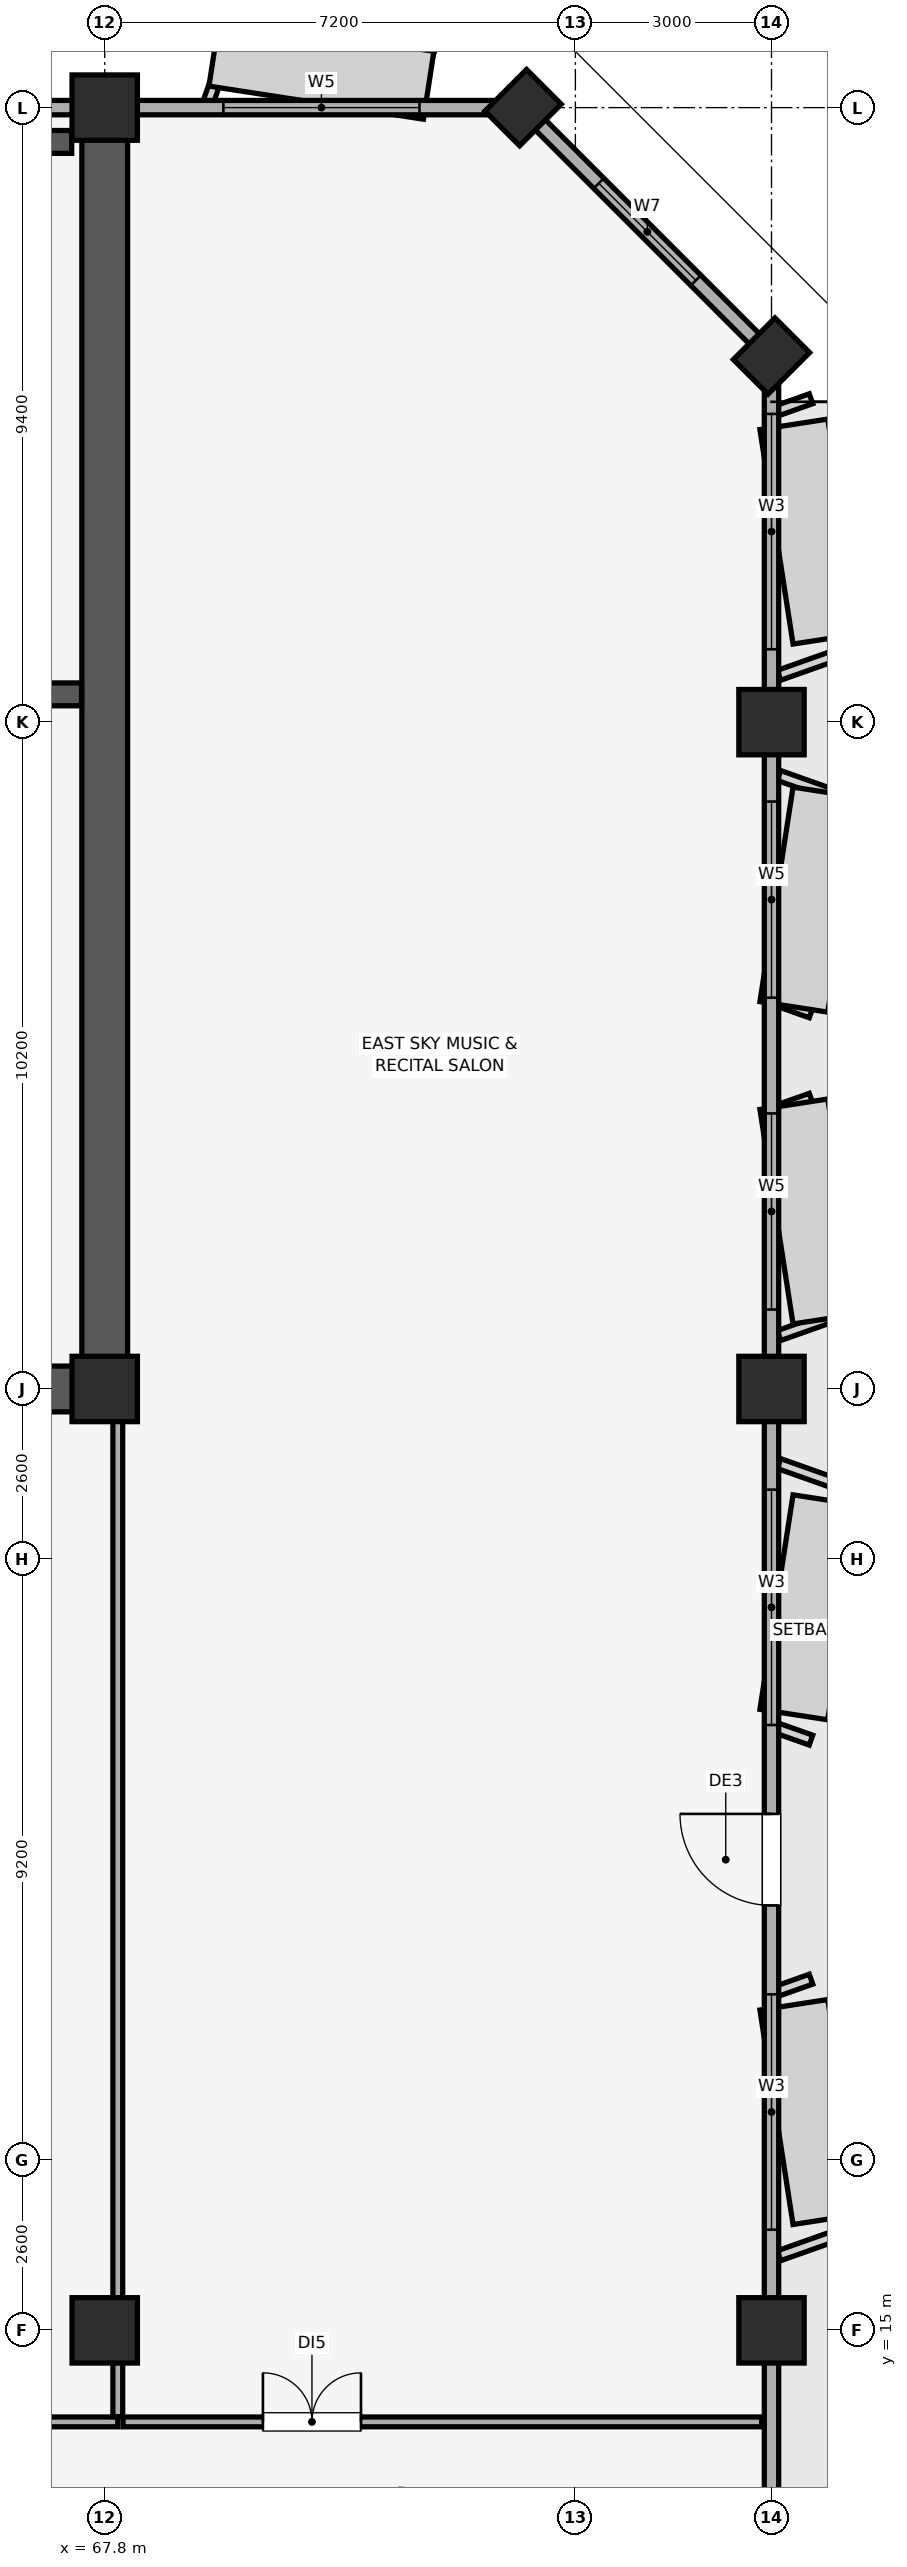
"""IFC4 building model, lengths in metres.
Left out: names, types, materials, properties, quantities, classifications, styles, units other than length and angle.
Written with IfcOpenShell. Run it as: python <this file> out.ifc"""

import sys

from ifc_helpers import new_model, si_unit, direction, frame, frame_2d, origin, origin_2d, place, context, subcontext, project, spatial, rectangle, extrude, element, fill, save


model = new_model("IFC4")
c1 = context("Model", 3, precision=1e-05, world=origin(), true_north=direction((0.0, 1.0)))
c2 = subcontext(c1, "Body", "Model", "MODEL_VIEW")
j1 = project(units=[si_unit("LENGTHUNIT", "METRE"), si_unit("PLANEANGLEUNIT", "RADIAN")], contexts=[c1])
p1 = place(None, origin())
s1 = spatial("IfcSite", under=j1, at=p1, CompositionType="ELEMENT")
p2 = place(p1, origin())
s2 = spatial("IfcBuilding", under=s1, at=p2, CompositionType="ELEMENT")
p3 = place(p2, frame((0.0, 0.0, 229.15)))
s3 = spatial("IfcBuildingStorey", under=s2, at=p3, CompositionType="ELEMENT", Elevation=229.15)
for number, where, z_axis, x_axis in (
    (1, (78.0, 15.0, 0.0), (0.0, 0.0, 1.0), (1.0, 0.0, 0.0)),
    (2, (78.0, 29.4, 0.0), (0.0, 0.0, 1.0), (1.0, 0.0, 0.0)),
    (3, (78.0, 39.6, 0.0), (0.0, 0.0, 1.0), (1.0, 0.0, 0.0)),
):
    element("IfcColumn", number, at=place(p3, frame(where, z_axis=z_axis, x_axis=x_axis)), inside=s3, PredefinedType="COLUMN", context=c2, shape_type="SweptSolid", body=[
        extrude(rectangle(XDim=1.0, YDim=1.0, at=origin_2d()), origin(), (0.0, 0.0, 1.0), 3.71),
    ])
for number, where, z_axis, x_axis in (
    (4, (78.0, 45.2, 0.0), (0.0, 0.0, 1.0), (0.707, 0.707, 0.0)),
    (5, (74.2, 49.0, 0.0), (0.0, 0.0, 1.0), (0.707, 0.707, 0.0)),
):
    element("IfcColumn", number, at=place(p3, frame(where, z_axis=z_axis, x_axis=x_axis)), inside=s3, PredefinedType="PILASTER", context=c2, shape_type="SweptSolid", body=[
        extrude(rectangle(XDim=0.9, YDim=0.75, at=origin_2d()), origin(), (0.0, 0.0, 1.0), 3.71),
    ])
for number, where, z_axis, x_axis in (
    (6, (67.8, 15.0, 0.0), (0.0, 0.0, 1.0), (1.0, 0.0, 0.0)),
    (7, (67.8, 29.4, 0.0), (0.0, 0.0, 1.0), (1.0, 0.0, 0.0)),
    (8, (67.8, 49.0, 0.0), (0.0, 0.0, 1.0), (1.0, 0.0, 0.0)),
):
    element("IfcColumn", number, at=place(p3, frame(where, z_axis=z_axis, x_axis=x_axis)), inside=s3, PredefinedType="COLUMN", context=c2, shape_type="SweptSolid", body=[
        extrude(rectangle(XDim=1.0, YDim=1.0, at=origin_2d()), origin(), (0.0, 0.0, 1.0), 3.71),
    ])
p4 = place(p3, frame((78.0, 9.8, 0.0), z_axis=(0.0, 0.0, 1.0), x_axis=(0.0, 1.0, 0.0)))
e9 = element("IfcWall", 9, at=p4, inside=s3, PredefinedType="SOLIDWALL", context=c2, shape_type="SweptSolid", body=[
    extrude(rectangle(XDim=35.4, YDim=0.22, at=frame_2d((17.7, 0.0))), origin(), (0.0, 0.0, 1.0), 2.91),
])
p5 = place(p4, frame((11.7, 0.0, 0.0)))
e10 = element("IfcOpeningElement", 10, at=p5, cuts=e9, PredefinedType="OPENING", context=c2, shape_type="SweptSolid", body=[
    extrude(rectangle(XDim=1.4, YDim=2.2, at=frame_2d((0.7, 1.1))), frame((0.0, 0.12, 0.0), z_axis=(0.0, -1.0, 0.0), x_axis=(1.0, 0.0, 0.0)), (0.0, 0.0, 1.0), 0.24),
])
p6 = place(p4, frame((6.74, 0.0, 0.85)))
e11 = element("IfcOpeningElement", 11, at=p6, cuts=e9, PredefinedType="OPENING", context=c2, shape_type="SweptSolid", body=[
    extrude(rectangle(XDim=3.6, YDim=1.65, at=frame_2d((1.8, 0.825))), frame((0.0, 0.12, 0.0), z_axis=(0.0, -1.0, 0.0), x_axis=(1.0, 0.0, 0.0)), (0.0, 0.0, 1.0), 0.24),
])
p7 = place(p4, frame((14.46, 0.0, 0.85)))
e12 = element("IfcOpeningElement", 12, at=p7, cuts=e9, PredefinedType="OPENING", context=c2, shape_type="SweptSolid", body=[
    extrude(rectangle(XDim=3.6, YDim=1.65, at=frame_2d((1.8, 0.825))), frame((0.0, 0.12, 0.0), z_axis=(0.0, -1.0, 0.0), x_axis=(1.0, 0.0, 0.0)), (0.0, 0.0, 1.0), 0.24),
])
p8 = place(p4, frame((20.815, 0.0, 0.85)))
e13 = element("IfcOpeningElement", 13, at=p8, cuts=e9, PredefinedType="OPENING", context=c2, shape_type="SweptSolid", body=[
    extrude(rectangle(XDim=3.0, YDim=1.5, at=frame_2d((1.5, 0.75))), frame((0.0, 0.12, 0.0), z_axis=(0.0, -1.0, 0.0), x_axis=(1.0, 0.0, 0.0)), (0.0, 0.0, 1.0), 0.24),
])
p9 = place(p4, frame((25.585, 0.0, 0.85)))
e14 = element("IfcOpeningElement", 14, at=p9, cuts=e9, PredefinedType="OPENING", context=c2, shape_type="SweptSolid", body=[
    extrude(rectangle(XDim=3.0, YDim=1.5, at=frame_2d((1.5, 0.75))), frame((0.0, 0.12, 0.0), z_axis=(0.0, -1.0, 0.0), x_axis=(1.0, 0.0, 0.0)), (0.0, 0.0, 1.0), 0.24),
])
p10 = place(p4, frame((30.915, 0.0, 0.85)))
e15 = element("IfcOpeningElement", 15, at=p10, cuts=e9, PredefinedType="OPENING", context=c2, shape_type="SweptSolid", body=[
    extrude(rectangle(XDim=3.6, YDim=1.65, at=frame_2d((1.8, 0.825))), frame((0.0, 0.12, 0.0), z_axis=(0.0, -1.0, 0.0), x_axis=(1.0, 0.0, 0.0)), (0.0, 0.0, 1.0), 0.24),
])
p11 = place(p3, frame((78.0, 45.2, 0.0), z_axis=(0.0, 0.0, 1.0), x_axis=(-0.707106781187, 0.707106781187, 0.0)))
e16 = element("IfcWall", 16, at=p11, inside=s3, PredefinedType="SOLIDWALL", context=c2, shape_type="SweptSolid", body=[
    extrude(rectangle(XDim=5.374, YDim=0.22, at=frame_2d((2.687, 0.0))), origin(), (0.0, 0.0, 1.0), 2.91),
])
p12 = place(p11, frame((1.637, 0.0, 0.85)))
e17 = element("IfcOpeningElement", 17, at=p12, cuts=e16, PredefinedType="OPENING", context=c2, shape_type="SweptSolid", body=[
    extrude(rectangle(XDim=2.1, YDim=1.6, at=frame_2d((1.05, 0.8))), frame((0.0, 0.12, 0.0), z_axis=(0.0, -1.0, 0.0), x_axis=(1.0, 0.0, 0.0)), (0.0, 0.0, 1.0), 0.24),
])
p13 = place(p3, frame((74.2, 49.0, 0.0), z_axis=(0.0, 0.0, 1.0), x_axis=(-1.0, 0.0, 0.0)))
e18 = element("IfcWall", 18, at=p13, inside=s3, PredefinedType="SOLIDWALL", context=c2, shape_type="SweptSolid", body=[
    extrude(rectangle(XDim=64.4, YDim=0.22, at=frame_2d((32.2, 0.0))), origin(), (0.0, 0.0, 1.0), 2.91),
])
p14 = place(p13, frame((59.815, 0.0, 0.85)))
e19 = element("IfcOpeningElement", 19, at=p14, cuts=e18, PredefinedType="OPENING", context=c2, shape_type="SweptSolid", body=[
    extrude(rectangle(XDim=3.0, YDim=1.5, at=frame_2d((1.5, 0.75))), frame((0.0, 0.12, 0.0), z_axis=(0.0, -1.0, 0.0), x_axis=(1.0, 0.0, 0.0)), (0.0, 0.0, 1.0), 0.24),
])
p15 = place(p13, frame((1.585, 0.0, 0.85)))
e20 = element("IfcOpeningElement", 20, at=p15, cuts=e18, PredefinedType="OPENING", context=c2, shape_type="SweptSolid", body=[
    extrude(rectangle(XDim=3.0, YDim=1.5, at=frame_2d((1.5, 0.75))), frame((0.0, 0.12, 0.0), z_axis=(0.0, -1.0, 0.0), x_axis=(1.0, 0.0, 0.0)), (0.0, 0.0, 1.0), 0.24),
])
p16 = place(p13, frame((44.715, 0.0, 0.9)))
e21 = element("IfcOpeningElement", 21, at=p16, cuts=e18, PredefinedType="OPENING", context=c2, shape_type="SweptSolid", body=[
    extrude(rectangle(XDim=3.6, YDim=1.5, at=frame_2d((1.8, 0.75))), frame((0.0, 0.12, 0.0), z_axis=(0.0, -1.0, 0.0), x_axis=(1.0, 0.0, 0.0)), (0.0, 0.0, 1.0), 0.24),
])
p17 = place(p13, frame((38.5, 0.0, 0.9)))
e22 = element("IfcOpeningElement", 22, at=p17, cuts=e18, PredefinedType="OPENING", context=c2, shape_type="SweptSolid", body=[
    extrude(rectangle(XDim=2.4, YDim=1.5, at=frame_2d((1.2, 0.75))), frame((0.0, 0.12, 0.0), z_axis=(0.0, -1.0, 0.0), x_axis=(1.0, 0.0, 0.0)), (0.0, 0.0, 1.0), 0.24),
])
p18 = place(p13, frame((21.75, 0.0, 0.9)))
e23 = element("IfcOpeningElement", 23, at=p18, cuts=e18, PredefinedType="OPENING", context=c2, shape_type="SweptSolid", body=[
    extrude(rectangle(XDim=3.0, YDim=1.5, at=frame_2d((1.5, 0.75))), frame((0.0, 0.12, 0.0), z_axis=(0.0, -1.0, 0.0), x_axis=(1.0, 0.0, 0.0)), (0.0, 0.0, 1.0), 0.24),
])
p19 = place(p13, frame((17.435, 0.0, 0.9)))
e24 = element("IfcOpeningElement", 24, at=p19, cuts=e18, PredefinedType="OPENING", context=c2, shape_type="SweptSolid", body=[
    extrude(rectangle(XDim=2.4, YDim=1.5, at=frame_2d((1.2, 0.75))), frame((0.0, 0.12, 0.0), z_axis=(0.0, -1.0, 0.0), x_axis=(1.0, 0.0, 0.0)), (0.0, 0.0, 1.0), 0.24),
])
p20 = place(p3, frame((67.8, 29.4, 0.0), z_axis=(0.0, 0.0, 1.0), x_axis=(0.0, 1.0, 0.0)))
e25 = element("IfcWall", 25, at=p20, inside=s3, PredefinedType="SHEAR", context=c2, shape_type="SweptSolid", body=[
    extrude(rectangle(XDim=19.2, YDim=0.7, at=frame_2d((9.6, 0.0))), origin(), (0.0, 0.0, 1.0), 3.71),
])
p21 = place(p3, frame((60.4, 29.4, 0.0), z_axis=(0.0, 0.0, 1.0), x_axis=(1.0, 0.0, 0.0)))
e26 = element("IfcWall", 26, at=p21, inside=s3, PredefinedType="SHEAR", context=c2, shape_type="SweptSolid", body=[
    extrude(rectangle(XDim=7.045, YDim=0.7, at=frame_2d((3.522, 0.0))), origin(), (0.0, 0.0, 1.0), 3.71),
])
p22 = place(p3, frame((63.145, 40.025, 0.0), z_axis=(0.0, 0.0, 1.0), x_axis=(1.0, 0.0, 0.0)))
e27 = element("IfcWall", 27, at=p22, inside=s3, PredefinedType="SHEAR", context=c2, shape_type="SweptSolid", body=[
    extrude(rectangle(XDim=4.3, YDim=0.35, at=frame_2d((2.15, 0.0))), origin(), (0.0, 0.0, 1.0), 3.71),
])
p23 = place(p22, frame((1.24, 0.0, 0.0)))
e28 = element("IfcOpeningElement", 28, at=p23, cuts=e27, PredefinedType="OPENING", context=c2, shape_type="SweptSolid", body=[
    extrude(rectangle(XDim=1.15, YDim=2.15, at=frame_2d((0.575, 1.075))), frame((0.0, 0.185, 0.0), z_axis=(0.0, -1.0, 0.0), x_axis=(1.0, 0.0, 0.0)), (0.0, 0.0, 1.0), 0.37),
])
p24 = place(p3, frame((63.145, 48.475, 0.0), z_axis=(0.0, 0.0, 1.0), x_axis=(1.0, 0.0, 0.0)))
e29 = element("IfcWall", 29, at=p24, inside=s3, PredefinedType="SHEAR", context=c2, shape_type="SweptSolid", body=[
    extrude(rectangle(XDim=4.15, YDim=0.35, at=frame_2d((2.075, 0.0))), origin(), (0.0, 0.0, 1.0), 3.71),
])
p25 = place(p3, frame((59.0, 13.6, 0.0), z_axis=(0.0, 0.0, 1.0), x_axis=(1.0, 0.0, 0.0)))
e30 = element("IfcWall", 30, at=p25, inside=s3, PredefinedType="PARTITIONING", context=c2, shape_type="SweptSolid", body=[
    extrude(rectangle(XDim=9.0, YDim=0.15, at=frame_2d((4.5, 0.0))), origin(), (0.0, 0.0, 1.0), 3.71),
])
p26 = place(p25, frame((4.0, 0.0, 0.0)))
e31 = element("IfcOpeningElement", 31, at=p26, cuts=e30, PredefinedType="OPENING", context=c2, shape_type="SweptSolid", body=[
    extrude(rectangle(XDim=1.0, YDim=2.15, at=frame_2d((0.5, 1.075))), frame((0.0, 0.085, 0.0), z_axis=(0.0, -1.0, 0.0), x_axis=(1.0, 0.0, 0.0)), (0.0, 0.0, 1.0), 0.17),
])
p27 = place(p3, frame((68.0, 13.68, 0.0), z_axis=(0.0, 0.0, 1.0), x_axis=(0.0, 1.0, 0.0)))
e32 = element("IfcWall", 32, at=p27, inside=s3, PredefinedType="PARTITIONING", context=c2, shape_type="SweptSolid", body=[
    extrude(rectangle(XDim=15.71, YDim=0.15, at=frame_2d((7.855, 0.0))), origin(), (0.0, 0.0, 1.0), 3.26),
])
p28 = place(p3, frame((68.08, 13.6, 0.0), z_axis=(0.0, 0.0, 1.0), x_axis=(1.0, 0.0, 0.0)))
e33 = element("IfcWall", 33, at=p28, inside=s3, PredefinedType="PARTITIONING", context=c2, shape_type="SweptSolid", body=[
    extrude(rectangle(XDim=9.77, YDim=0.15, at=frame_2d((4.885, 0.0))), origin(), (0.0, 0.0, 1.0), 3.71),
])
p29 = place(p28, frame((2.14, 0.0, 0.0)))
e34 = element("IfcOpeningElement", 34, at=p29, cuts=e33, PredefinedType="OPENING", context=c2, shape_type="SweptSolid", body=[
    extrude(rectangle(XDim=1.5, YDim=2.25, at=frame_2d((0.75, 1.125))), frame((0.0, 0.085, 0.0), z_axis=(0.0, -1.0, 0.0), x_axis=(1.0, 0.0, 0.0)), (0.0, 0.0, 1.0), 0.17),
])
p30 = place(p12, origin())
e35 = element("IfcWindow", 35, at=p30, inside=s3, PartitioningType="SINGLE_PANEL", PredefinedType="WINDOW", context=c2, shape_type="SweptSolid", body=[
    extrude(rectangle(XDim=2.1, YDim=1.6, at=frame_2d((1.05, 0.8))), frame((0.0, 0.03, 0.0), z_axis=(0.0, -1.0, 0.0), x_axis=(1.0, 0.0, 0.0)), (0.0, 0.0, 1.0), 0.06),
])
fill(e17, e35)
p31 = place(p5, origin())
e36 = element("IfcDoor", 36, at=p31, inside=s3, OperationType="SINGLE_SWING_RIGHT", PredefinedType="DOOR", context=c2, shape_type="SweptSolid", body=[
    extrude(rectangle(XDim=1.4, YDim=2.2, at=frame_2d((0.7, 1.1))), frame((0.0, 0.025, 0.0), z_axis=(0.0, -1.0, 0.0), x_axis=(1.0, 0.0, 0.0)), (0.0, 0.0, 1.0), 0.05),
])
fill(e10, e36)
p32 = place(p6, origin())
e37 = element("IfcWindow", 37, at=p32, inside=s3, PartitioningType="SINGLE_PANEL", PredefinedType="WINDOW", context=c2, shape_type="SweptSolid", body=[
    extrude(rectangle(XDim=3.6, YDim=1.65, at=frame_2d((1.8, 0.825))), frame((0.0, 0.03, 0.0), z_axis=(0.0, -1.0, 0.0), x_axis=(1.0, 0.0, 0.0)), (0.0, 0.0, 1.0), 0.06),
])
fill(e11, e37)
p33 = place(p7, origin())
e38 = element("IfcWindow", 38, at=p33, inside=s3, PartitioningType="SINGLE_PANEL", PredefinedType="WINDOW", context=c2, shape_type="SweptSolid", body=[
    extrude(rectangle(XDim=3.6, YDim=1.65, at=frame_2d((1.8, 0.825))), frame((0.0, 0.03, 0.0), z_axis=(0.0, -1.0, 0.0), x_axis=(1.0, 0.0, 0.0)), (0.0, 0.0, 1.0), 0.06),
])
fill(e12, e38)
p34 = place(p8, origin())
e39 = element("IfcWindow", 39, at=p34, inside=s3, PartitioningType="SINGLE_PANEL", PredefinedType="WINDOW", context=c2, shape_type="SweptSolid", body=[
    extrude(rectangle(XDim=3.0, YDim=1.5, at=frame_2d((1.5, 0.75))), frame((0.0, 0.03, 0.0), z_axis=(0.0, -1.0, 0.0), x_axis=(1.0, 0.0, 0.0)), (0.0, 0.0, 1.0), 0.06),
])
fill(e13, e39)
p35 = place(p9, origin())
e40 = element("IfcWindow", 40, at=p35, inside=s3, PartitioningType="SINGLE_PANEL", PredefinedType="WINDOW", context=c2, shape_type="SweptSolid", body=[
    extrude(rectangle(XDim=3.0, YDim=1.5, at=frame_2d((1.5, 0.75))), frame((0.0, 0.03, 0.0), z_axis=(0.0, -1.0, 0.0), x_axis=(1.0, 0.0, 0.0)), (0.0, 0.0, 1.0), 0.06),
])
fill(e14, e40)
p36 = place(p10, origin())
e41 = element("IfcWindow", 41, at=p36, inside=s3, PartitioningType="SINGLE_PANEL", PredefinedType="WINDOW", context=c2, shape_type="SweptSolid", body=[
    extrude(rectangle(XDim=3.6, YDim=1.65, at=frame_2d((1.8, 0.825))), frame((0.0, 0.03, 0.0), z_axis=(0.0, -1.0, 0.0), x_axis=(1.0, 0.0, 0.0)), (0.0, 0.0, 1.0), 0.06),
])
fill(e15, e41)
p37 = place(p15, origin())
e42 = element("IfcWindow", 42, at=p37, inside=s3, PartitioningType="SINGLE_PANEL", PredefinedType="WINDOW", context=c2, shape_type="SweptSolid", body=[
    extrude(rectangle(XDim=3.0, YDim=1.5, at=frame_2d((1.5, 0.75))), frame((0.0, 0.03, 0.0), z_axis=(0.0, -1.0, 0.0), x_axis=(1.0, 0.0, 0.0)), (0.0, 0.0, 1.0), 0.06),
])
fill(e20, e42)
p38 = place(p29, origin())
e43 = element("IfcDoor", 43, at=p38, inside=s3, OperationType="DOUBLE_DOOR_SINGLE_SWING", PredefinedType="DOOR", context=c2, shape_type="SweptSolid", body=[
    extrude(rectangle(XDim=1.5, YDim=2.25, at=frame_2d((0.75, 1.125))), frame((0.0, 0.025, 0.0), z_axis=(0.0, -1.0, 0.0), x_axis=(1.0, 0.0, 0.0)), (0.0, 0.0, 1.0), 0.05),
])
fill(e34, e43)
save(model, sys.argv[1])
